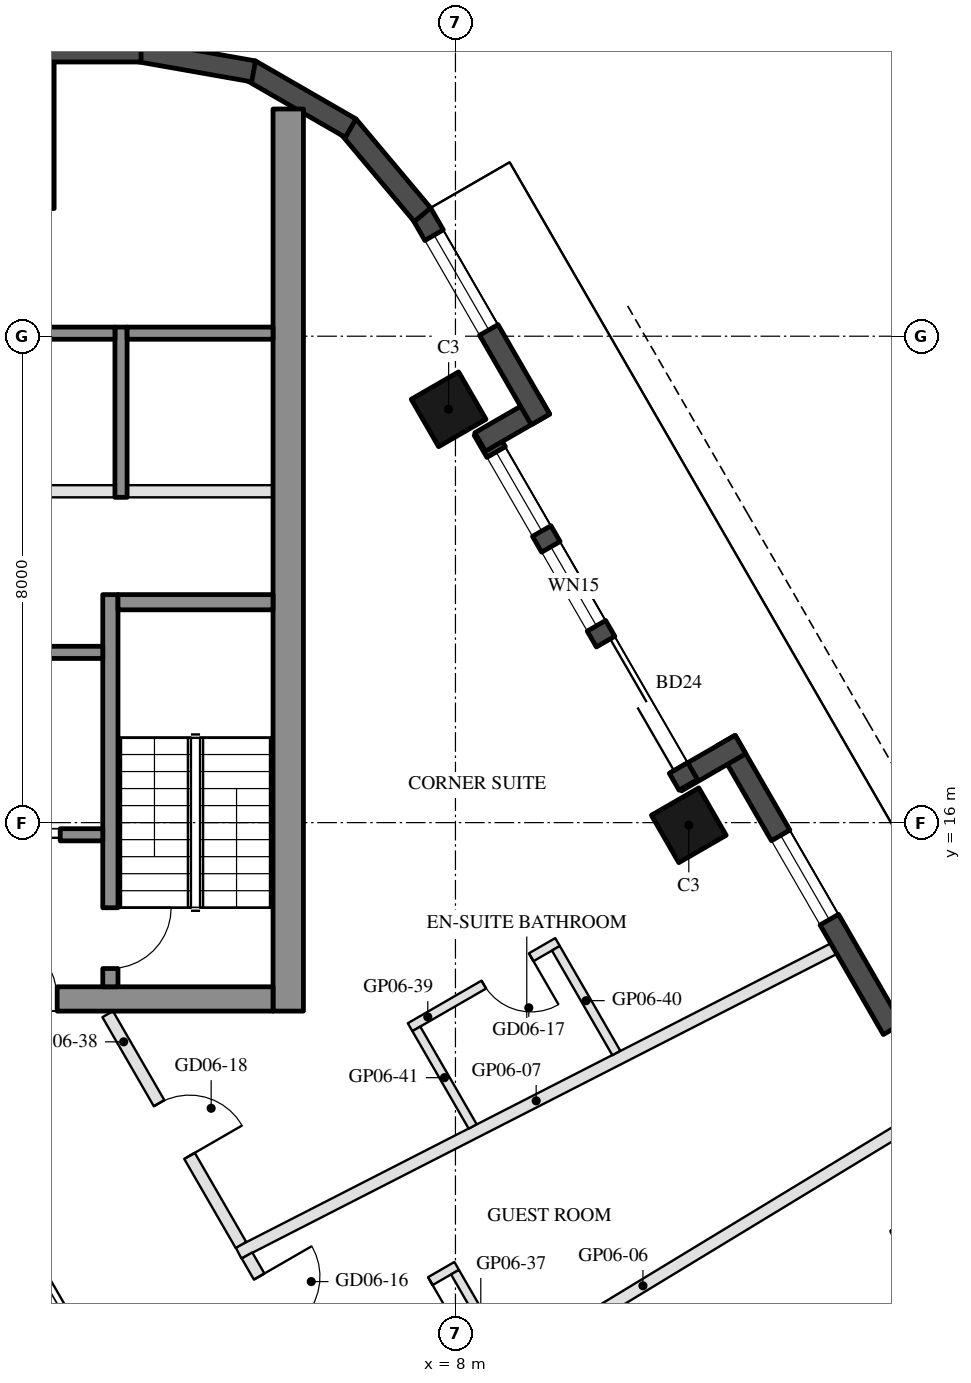
"""IFC4 building model, lengths in metres.
Left out: names, types, materials, properties, quantities, classifications, styles, units other than length and angle.
Written with IfcOpenShell. Run it as: python <this file> out.ifc"""

import sys

from ifc_helpers import new_model, si_unit, direction, frame, frame_2d, origin, origin_2d, place, context, subcontext, project, spatial, rectangle, hollow_rectangle, extrude, element, fill, save


model = new_model("IFC4")
c1 = context("Model", 3, precision=1e-05, world=origin(), true_north=direction((0.0, 1.0)))
c2 = subcontext(c1, "Body", "Model", "MODEL_VIEW")
j1 = project(units=[si_unit("LENGTHUNIT", "METRE"), si_unit("PLANEANGLEUNIT", "RADIAN")], contexts=[c1])
p1 = place(None, origin())
s1 = spatial("IfcSite", under=j1, at=p1, CompositionType="ELEMENT")
p2 = place(p1, origin())
s2 = spatial("IfcBuilding", under=s1, at=p2, CompositionType="ELEMENT")
p3 = place(p2, frame((0.0, 0.0, 90.9)))
s3 = spatial("IfcBuildingStorey", under=s2, at=p3, CompositionType="ELEMENT", Elevation=90.9)
for number, where, z_axis, x_axis in (
    (1, (11.838, 15.957, 0.0), (0.0, 0.0, 1.0), (-0.5, 0.866, 0.0)),
    (2, (7.888, 22.798, 0.0), (0.0, 0.0, 1.0), (-0.5, 0.866, 0.0)),
):
    element("IfcColumn", number, at=place(p3, frame(where, z_axis=z_axis, x_axis=x_axis)), inside=s3, PredefinedType="COLUMN", context=c2, shape_type="SweptSolid", body=[
        extrude(hollow_rectangle(XDim=0.9, YDim=0.9, WallThickness=0.04, at=origin_2d()), origin(), (0.0, 0.0, 1.0), 3.7),
    ])
p4 = place(p3, frame((0.0, 27.3, 0.0), z_axis=(0.0, 0.0, 1.0), x_axis=(1.0, 0.0, 0.0)))
e3 = element("IfcColumn", 3, at=p4, inside=s3, PredefinedType="COLUMN", context=c2, shape_type="SweptSolid", body=[
    extrude(hollow_rectangle(XDim=2.8, YDim=2.4, WallThickness=0.07, at=origin_2d()), origin(), (0.0, 0.0, 1.0), 3.7),
])
p5 = place(p3, frame((17.299, 8.948, 0.0), z_axis=(0.0, 0.0, 1.0), x_axis=(-0.500010041276, 0.866019606374, 0.0)))
e4 = element("IfcWall", 4, at=p5, inside=s3, PredefinedType="SOLIDWALL", context=c2, shape_type="SweptSolid", body=[
    extrude(rectangle(XDim=9.7, YDim=0.35, at=frame_2d((4.85, 0.0))), origin(), (0.0, 0.0, 1.0), 3.55),
])
p6 = place(p5, frame((3.22, 0.0, 0.0)))
e5 = element("IfcOpeningElement", 5, at=p6, cuts=e4, PredefinedType="OPENING", context=c2, shape_type="SweptSolid", body=[
    extrude(rectangle(XDim=1.0, YDim=2.4, at=frame_2d((0.5, 1.2))), frame((0.0, 0.185, 0.0), z_axis=(0.0, -1.0, 0.0), x_axis=(1.0, 0.0, 0.0)), (0.0, 0.0, 1.0), 0.37),
])
p7 = place(p5, frame((6.3, 0.0, 0.3)))
e6 = element("IfcOpeningElement", 6, at=p7, cuts=e4, PredefinedType="OPENING", context=c2, shape_type="SweptSolid", body=[
    extrude(rectangle(XDim=1.6, YDim=2.65, at=frame_2d((0.8, 1.325))), frame((0.0, 0.185, 0.0), z_axis=(0.0, -1.0, 0.0), x_axis=(1.0, 0.0, 0.0)), (0.0, 0.0, 1.0), 0.37),
])
p8 = place(p3, frame((12.688, 17.284, 0.0), z_axis=(0.0, 0.0, 1.0), x_axis=(-0.865955602162, -0.500120880472, 0.0)))
e7 = element("IfcWall", 7, at=p8, inside=s3, PredefinedType="SOLIDWALL", context=c2, shape_type="SweptSolid", body=[
    extrude(rectangle(XDim=1.22, YDim=0.35, at=frame_2d((0.61, 0.0))), origin(), (0.0, 0.0, 1.0), 3.55),
])
p9 = place(p3, frame((11.829, 16.621, 0.0), z_axis=(0.0, 0.0, 1.0), x_axis=(-0.500003597184, 0.866023326939, 0.0)))
e8 = element("IfcWall", 8, at=p9, inside=s3, PredefinedType="SOLIDWALL", context=c2, shape_type="SweptSolid", body=[
    extrude(rectangle(XDim=6.74, YDim=0.35, at=frame_2d((3.37, 0.0))), origin(), (0.0, 0.0, 1.0), 3.55),
])
p10 = place(p9, frame((0.32, 0.0, 0.0)))
e9 = element("IfcOpeningElement", 9, at=p10, cuts=e8, PredefinedType="OPENING", context=c2, shape_type="SweptSolid", body=[
    extrude(rectangle(XDim=2.4, YDim=2.4, at=frame_2d((1.2, 1.2))), frame((0.0, 0.185, 0.0), z_axis=(0.0, -1.0, 0.0), x_axis=(1.0, 0.0, 0.0)), (0.0, 0.0, 1.0), 0.37),
])
p11 = place(p9, frame((3.02, 0.0, 0.3)))
e10 = element("IfcOpeningElement", 10, at=p11, cuts=e8, PredefinedType="OPENING", context=c2, shape_type="SweptSolid", body=[
    extrude(rectangle(XDim=1.5, YDim=2.65, at=frame_2d((0.75, 1.325))), frame((0.0, 0.185, 0.0), z_axis=(0.0, -1.0, 0.0), x_axis=(1.0, 0.0, 0.0)), (0.0, 0.0, 1.0), 0.37),
])
p12 = place(p9, frame((4.82, 0.0, 0.3)))
e11 = element("IfcOpeningElement", 11, at=p12, cuts=e8, PredefinedType="OPENING", context=c2, shape_type="SweptSolid", body=[
    extrude(rectangle(XDim=1.5, YDim=2.65, at=frame_2d((0.75, 1.325))), frame((0.0, 0.185, 0.0), z_axis=(0.0, -1.0, 0.0), x_axis=(1.0, 0.0, 0.0)), (0.0, 0.0, 1.0), 0.37),
])
p13 = place(p3, frame((8.406, 22.26, 0.0), z_axis=(0.0, 0.0, 1.0), x_axis=(0.865955602162, 0.500120880472, 0.0)))
e12 = element("IfcWall", 12, at=p13, inside=s3, PredefinedType="SOLIDWALL", context=c2, shape_type="SweptSolid", body=[
    extrude(rectangle(XDim=1.22, YDim=0.35, at=frame_2d((0.61, 0.0))), origin(), (0.0, 0.0, 1.0), 3.55),
])
p14 = place(p3, frame((9.398, 22.631, 0.0), z_axis=(0.0, 0.0, 1.0), x_axis=(-0.499954521343, 0.866051659307, 0.0)))
e13 = element("IfcWall", 13, at=p14, inside=s3, PredefinedType="SOLIDWALL", context=c2, shape_type="SweptSolid", body=[
    extrude(rectangle(XDim=3.916, YDim=0.35, at=frame_2d((1.958, 0.0))), origin(), (0.0, 0.0, 1.0), 3.55),
])
p15 = place(p14, frame((1.7, 0.0, 0.3)))
e14 = element("IfcOpeningElement", 14, at=p15, cuts=e13, PredefinedType="OPENING", context=c2, shape_type="SweptSolid", body=[
    extrude(rectangle(XDim=1.8, YDim=2.65, at=frame_2d((0.9, 1.325))), frame((0.0, 0.185, 0.0), z_axis=(0.0, -1.0, 0.0), x_axis=(1.0, 0.0, 0.0)), (0.0, 0.0, 1.0), 0.37),
])
p16 = place(p3, frame((7.458, 25.998, 0.0), z_axis=(0.0, 0.0, 1.0), x_axis=(-0.642808304945, 0.766027077259, 0.0)))
e15 = element("IfcWall", 15, at=p16, inside=s3, PredefinedType="SOLIDWALL", context=c2, shape_type="SweptSolid", body=[
    extrude(rectangle(XDim=1.91, YDim=0.35, at=frame_2d((0.955, 0.0))), origin(), (0.0, 0.0, 1.0), 3.55),
])
for number, where, z_axis, x_axis in (
    (16, (6.277, 27.422, 0.0), (0.0, 0.0, 1.0), (-0.866, 0.5, 0.0)),
    (17, (4.68, 28.356, 0.0), (0.0, 0.0, 1.0), (-0.985, 0.174, 0.0)),
):
    element("IfcWall", number, at=place(p3, frame(where, z_axis=z_axis, x_axis=x_axis)), inside=s3, PredefinedType="SOLIDWALL", context=c2, shape_type="SweptSolid", body=[
        extrude(rectangle(XDim=1.91, YDim=0.35, at=frame_2d((0.955, 0.0))), origin(), (0.0, 0.0, 1.0), 3.55),
    ])
p17 = place(p3, frame((2.829, 28.685, 0.0), z_axis=(0.0, 0.0, 1.0), x_axis=(-1.0, 0.0, 0.0)))
e18 = element("IfcWall", 18, at=p17, inside=s3, PredefinedType="SOLIDWALL", context=c2, shape_type="SweptSolid", body=[
    extrude(rectangle(XDim=5.658, YDim=0.35, at=frame_2d((2.829, 0.0))), origin(), (0.0, 0.0, 1.0), 3.55),
])
p18 = place(p3, frame((5.25, 12.9, 0.0), z_axis=(0.0, 0.0, 1.0), x_axis=(0.0, 1.0, 0.0)))
e19 = element("IfcWall", 19, at=p18, inside=s3, PredefinedType="SHEAR", context=c2, shape_type="SweptSolid", body=[
    extrude(rectangle(XDim=14.837, YDim=0.5, at=frame_2d((7.418, 0.0))), origin(), (0.0, 0.0, 1.0), 3.5),
])
p19 = place(p3, frame((5.0, 13.1, 0.0), z_axis=(0.0, 0.0, 1.0), x_axis=(-1.0, 0.0, 0.0)))
e20 = element("IfcWall", 20, at=p19, inside=s3, PredefinedType="SHEAR", context=c2, shape_type="SweptSolid", body=[
    extrude(rectangle(XDim=10.0, YDim=0.4, at=frame_2d((5.0, 0.0))), origin(), (0.0, 0.0, 1.0), 3.5),
])
p20 = place(p19, frame((3.55, 0.0, 0.0)))
e21 = element("IfcOpeningElement", 21, at=p20, cuts=e20, PredefinedType="OPENING", context=c2, shape_type="SweptSolid", body=[
    extrude(rectangle(XDim=1.1, YDim=2.1, at=frame_2d((0.55, 1.05))), frame((0.0, 0.21, 0.0), z_axis=(0.0, -1.0, 0.0), x_axis=(1.0, 0.0, 0.0)), (0.0, 0.0, 1.0), 0.42),
])
p21 = place(p19, frame((5.85, 0.0, 0.0)))
e22 = element("IfcOpeningElement", 22, at=p21, cuts=e20, PredefinedType="OPENING", context=c2, shape_type="SweptSolid", body=[
    extrude(rectangle(XDim=1.4, YDim=2.1, at=frame_2d((0.7, 1.05))), frame((0.0, 0.21, 0.0), z_axis=(0.0, -1.0, 0.0), x_axis=(1.0, 0.0, 0.0)), (0.0, 0.0, 1.0), 0.42),
])
p22 = place(p3, frame((2.325, 13.3, 0.0), z_axis=(0.0, 0.0, 1.0), x_axis=(0.0, 1.0, 0.0)))
e23 = element("IfcWall", 23, at=p22, inside=s3, PredefinedType="SHEAR", context=c2, shape_type="SweptSolid", body=[
    extrude(rectangle(XDim=6.45, YDim=0.25, at=frame_2d((3.225, 0.0))), origin(), (0.0, 0.0, 1.0), 3.5),
])
p23 = place(p22, frame((0.3, 0.0, 0.0)))
e24 = element("IfcOpeningElement", 24, at=p23, cuts=e23, PredefinedType="OPENING", context=c2, shape_type="SweptSolid", body=[
    extrude(rectangle(XDim=1.0, YDim=2.1, at=frame_2d((0.5, 1.05))), frame((0.0, 0.135, 0.0), z_axis=(0.0, -1.0, 0.0), x_axis=(1.0, 0.0, 0.0)), (0.0, 0.0, 1.0), 0.27),
])
p24 = place(p3, frame((5.0, 19.625, 0.0), z_axis=(0.0, 0.0, 1.0), x_axis=(-1.0, 0.0, 0.0)))
e25 = element("IfcWall", 25, at=p24, inside=s3, PredefinedType="SHEAR", context=c2, shape_type="SweptSolid", body=[
    extrude(rectangle(XDim=2.55, YDim=0.25, at=frame_2d((1.275, 0.0))), origin(), (0.0, 0.0, 1.0), 3.5),
])
p25 = place(p3, frame((2.2, 18.8, 0.0), z_axis=(0.0, 0.0, 1.0), x_axis=(-1.0, 0.0, 0.0)))
e26 = element("IfcWall", 26, at=p25, inside=s3, PredefinedType="SHEAR", context=c2, shape_type="SweptSolid", body=[
    extrude(rectangle(XDim=2.8, YDim=0.2, at=frame_2d((1.4, 0.0))), origin(), (0.0, 0.0, 1.0), 3.5),
])
p26 = place(p3, frame((2.2, 15.8, 0.0), z_axis=(0.0, 0.0, 1.0), x_axis=(-1.0, 0.0, 0.0)))
e27 = element("IfcWall", 27, at=p26, inside=s3, PredefinedType="SHEAR", context=c2, shape_type="SweptSolid", body=[
    extrude(rectangle(XDim=2.8, YDim=0.2, at=frame_2d((1.4, 0.0))), origin(), (0.0, 0.0, 1.0), 3.5),
])
p27 = place(p26, frame((0.7, 0.0, 0.0)))
e28 = element("IfcOpeningElement", 28, at=p27, cuts=e27, PredefinedType="OPENING", context=c2, shape_type="SweptSolid", body=[
    extrude(rectangle(XDim=1.2, YDim=2.1, at=frame_2d((0.6, 1.05))), frame((0.0, 0.11, 0.0), z_axis=(0.0, -1.0, 0.0), x_axis=(1.0, 0.0, 0.0)), (0.0, 0.0, 1.0), 0.22),
])
p28 = place(p3, frame((2.5, 21.35, 0.0), z_axis=(0.0, 0.0, 1.0), x_axis=(0.0, 1.0, 0.0)))
e29 = element("IfcWall", 29, at=p28, inside=s3, PredefinedType="SHEAR", context=c2, shape_type="SweptSolid", body=[
    extrude(rectangle(XDim=2.8, YDim=0.2, at=frame_2d((1.4, 0.0))), origin(), (0.0, 0.0, 1.0), 3.5),
])
p29 = place(p3, frame((5.0, 24.05, 0.0), z_axis=(0.0, 0.0, 1.0), x_axis=(-1.0, 0.0, 0.0)))
e30 = element("IfcWall", 30, at=p29, inside=s3, PredefinedType="SHEAR", context=c2, shape_type="SweptSolid", body=[
    extrude(rectangle(XDim=2.4, YDim=0.2, at=frame_2d((1.2, 0.0))), origin(), (0.0, 0.0, 1.0), 3.5),
])
p30 = place(p3, frame((2.4, 24.05, 0.0), z_axis=(0.0, 0.0, 1.0), x_axis=(-1.0, 0.0, 0.0)))
e31 = element("IfcWall", 31, at=p30, inside=s3, PredefinedType="SHEAR", context=c2, shape_type="SweptSolid", body=[
    extrude(rectangle(XDim=2.8, YDim=0.2, at=frame_2d((1.4, 0.0))), origin(), (0.0, 0.0, 1.0), 3.5),
])
p31 = place(p3, frame((5.0, 21.45, 0.0), z_axis=(0.0, 0.0, 1.0), x_axis=(-1.0, 0.0, 0.0)))
e32 = element("IfcWall", 32, at=p31, inside=s3, PredefinedType="PARTITIONING", context=c2, shape_type="SweptSolid", body=[
    extrude(rectangle(XDim=2.4, YDim=0.2, at=frame_2d((1.2, 0.0))), origin(), (0.0, 0.0, 1.0), 3.5),
])
p32 = place(p3, frame((2.4, 21.45, 0.0), z_axis=(0.0, 0.0, 1.0), x_axis=(-1.0, 0.0, 0.0)))
e33 = element("IfcWall", 33, at=p32, inside=s3, PredefinedType="PARTITIONING", context=c2, shape_type="SweptSolid", body=[
    extrude(rectangle(XDim=2.8, YDim=0.2, at=frame_2d((1.4, 0.0))), origin(), (0.0, 0.0, 1.0), 3.5),
])
p33 = place(p3, frame((15.777, 11.233, 0.0), z_axis=(0.0, 0.0, 1.0), x_axis=(-0.854689239939, -0.519139964877, 0.0)))
e34 = element("IfcWall", 34, at=p33, inside=s3, PredefinedType="PARTITIONING", context=c2, shape_type="SweptSolid", body=[
    extrude(rectangle(XDim=10.983, YDim=0.2, at=frame_2d((5.491, 0.0))), origin(), (0.0, 0.0, 1.0), 2.96),
])
p34 = place(p3, frame((14.222, 13.927, 0.0), z_axis=(0.0, 0.0, 1.0), x_axis=(-0.890385282198, -0.455207699017, 0.0)))
e35 = element("IfcWall", 35, at=p34, inside=s3, PredefinedType="PARTITIONING", context=c2, shape_type="SweptSolid", body=[
    extrude(rectangle(XDim=10.994, YDim=0.2, at=frame_2d((5.497, 0.0))), origin(), (0.0, 0.0, 1.0), 2.96),
])
p35 = place(p3, frame((4.572, 8.881, 0.0), z_axis=(0.0, 0.0, 1.0), x_axis=(0.500041684057, -0.866001336145, 0.0)))
e36 = element("IfcWall", 36, at=p35, inside=s3, PredefinedType="PARTITIONING", context=c2, shape_type="SweptSolid", body=[
    extrude(rectangle(XDim=3.707, YDim=0.2, at=frame_2d((1.854, 0.0))), origin(), (0.0, 0.0, 1.0), 2.95),
])
p36 = place(p35, frame((0.4, 0.0, 0.0)))
e37 = element("IfcOpeningElement", 37, at=p36, cuts=e36, PredefinedType="OPENING", context=c2, shape_type="SweptSolid", body=[
    extrude(rectangle(XDim=1.0, YDim=2.1, at=frame_2d((0.5, 1.05))), frame((0.0, 0.11, 0.0), z_axis=(0.0, -1.0, 0.0), x_axis=(1.0, 0.0, 0.0)), (0.0, 0.0, 1.0), 0.22),
])
p37 = place(p3, frame((8.02, 8.709, 0.0), z_axis=(0.0, 0.0, 1.0), x_axis=(-0.866034573852, -0.49998411664, 0.0)))
e38 = element("IfcWall", 38, at=p37, inside=s3, PredefinedType="PARTITIONING", context=c2, shape_type="SweptSolid", body=[
    extrude(rectangle(XDim=2.8, YDim=0.15, at=frame_2d((1.4, 0.0))), origin(), (0.0, 0.0, 1.0), 3.55),
])
p38 = place(p37, frame((0.5, 0.0, 0.0)))
e39 = element("IfcOpeningElement", 39, at=p38, cuts=e38, PredefinedType="OPENING", context=c2, shape_type="SweptSolid", body=[
    extrude(rectangle(XDim=0.9, YDim=2.1, at=frame_2d((0.45, 1.05))), frame((0.0, 0.085, 0.0), z_axis=(0.0, -1.0, 0.0), x_axis=(1.0, 0.0, 0.0)), (0.0, 0.0, 1.0), 0.17),
])
p39 = place(p3, frame((8.841, 7.137, 0.0), z_axis=(0.0, 0.0, 1.0), x_axis=(-0.500054617923, 0.865993867816, 0.0)))
e40 = element("IfcWall", 40, at=p39, inside=s3, PredefinedType="PARTITIONING", context=c2, shape_type="SweptSolid", body=[
    extrude(rectangle(XDim=1.697, YDim=0.15, at=frame_2d((0.848, 0.0))), origin(), (0.0, 0.0, 1.0), 3.55),
])
p40 = place(p3, frame((2.281, 12.85, 0.0), z_axis=(0.0, 0.0, 1.0), x_axis=(0.499973180286, -0.8660408876, 0.0)))
e41 = element("IfcWall", 41, at=p40, inside=s3, PredefinedType="PARTITIONING", context=c2, shape_type="SweptSolid", body=[
    extrude(rectangle(XDim=4.383, YDim=0.2, at=frame_2d((2.191, 0.0))), origin(), (0.0, 0.0, 1.0), 2.95),
])
p41 = place(p40, frame((1.691, 0.0, 0.0)))
e42 = element("IfcOpeningElement", 42, at=p41, cuts=e41, PredefinedType="OPENING", context=c2, shape_type="SweptSolid", body=[
    extrude(rectangle(XDim=1.0, YDim=2.1, at=frame_2d((0.5, 1.05))), frame((0.0, 0.11, 0.0), z_axis=(0.0, -1.0, 0.0), x_axis=(1.0, 0.0, 0.0)), (0.0, 0.0, 1.0), 0.22),
])
p42 = place(p3, frame((9.679, 14.036, 0.0), z_axis=(0.0, 0.0, 1.0), x_axis=(-0.865996816683, -0.500049511043, 0.0)))
e43 = element("IfcWall", 43, at=p42, inside=s3, PredefinedType="PARTITIONING", context=c2, shape_type="SweptSolid", body=[
    extrude(rectangle(XDim=2.8, YDim=0.15, at=frame_2d((1.4, 0.0))), origin(), (0.0, 0.0, 1.0), 3.55),
])
p43 = place(p42, frame((0.5, 0.0, 0.0)))
e44 = element("IfcOpeningElement", 44, at=p43, cuts=e43, PredefinedType="OPENING", context=c2, shape_type="SweptSolid", body=[
    extrude(rectangle(XDim=0.9, YDim=2.1, at=frame_2d((0.45, 1.05))), frame((0.0, 0.085, 0.0), z_axis=(0.0, -1.0, 0.0), x_axis=(1.0, 0.0, 0.0)), (0.0, 0.0, 1.0), 0.17),
])
p44 = place(p3, frame((10.646, 12.211, 0.0), z_axis=(0.0, 0.0, 1.0), x_axis=(-0.50001992892, 0.866013897511, 0.0)))
e45 = element("IfcWall", 45, at=p44, inside=s3, PredefinedType="PARTITIONING", context=c2, shape_type="SweptSolid", body=[
    extrude(rectangle(XDim=1.989, YDim=0.15, at=frame_2d((0.995, 0.0))), origin(), (0.0, 0.0, 1.0), 3.55),
])
p45 = place(p3, frame((8.283, 11.003, 0.0), z_axis=(0.0, 0.0, 1.0), x_axis=(-0.499935264145, 0.866062775822, 0.0)))
e46 = element("IfcWall", 46, at=p45, inside=s3, PredefinedType="PARTITIONING", context=c2, shape_type="SweptSolid", body=[
    extrude(rectangle(XDim=1.854, YDim=0.15, at=frame_2d((0.927, 0.0))), origin(), (0.0, 0.0, 1.0), 3.55),
])
p46 = place(p6, frame((1.0, 0.0, 0.0), z_axis=(0.0, 0.0, 1.0), x_axis=(-1.0, 0.0, 0.0)))
e47 = element("IfcDoor", 47, at=p46, inside=s3, OperationType="SLIDING_TO_LEFT", PredefinedType="DOOR", context=c2, shape_type="SweptSolid", body=[
    extrude(rectangle(XDim=1.0, YDim=2.4, at=frame_2d((0.5, 1.2))), frame((0.0, 0.025, 0.0), z_axis=(0.0, -1.0, 0.0), x_axis=(1.0, 0.0, 0.0)), (0.0, 0.0, 1.0), 0.05),
])
fill(e5, e47)
p47 = place(p7, origin())
e48 = element("IfcWindow", 48, at=p47, inside=s3, PartitioningType="SINGLE_PANEL", PredefinedType="WINDOW", context=c2, shape_type="SweptSolid", body=[
    extrude(rectangle(XDim=1.6, YDim=2.65, at=frame_2d((0.8, 1.325))), frame((0.0, 0.03, 0.0), z_axis=(0.0, -1.0, 0.0), x_axis=(1.0, 0.0, 0.0)), (0.0, 0.0, 1.0), 0.06),
])
fill(e6, e48)
p48 = place(p10, frame((2.4, 0.0, 0.0), z_axis=(0.0, 0.0, 1.0), x_axis=(-1.0, 0.0, 0.0)))
e49 = element("IfcDoor", 49, at=p48, inside=s3, OperationType="SLIDING_TO_LEFT", PredefinedType="DOOR", context=c2, shape_type="SweptSolid", body=[
    extrude(rectangle(XDim=2.4, YDim=2.4, at=frame_2d((1.2, 1.2))), frame((0.0, 0.025, 0.0), z_axis=(0.0, -1.0, 0.0), x_axis=(1.0, 0.0, 0.0)), (0.0, 0.0, 1.0), 0.05),
])
fill(e9, e49)
p49 = place(p11, origin())
e50 = element("IfcWindow", 50, at=p49, inside=s3, PartitioningType="SINGLE_PANEL", PredefinedType="WINDOW", context=c2, shape_type="SweptSolid", body=[
    extrude(rectangle(XDim=1.5, YDim=2.65, at=frame_2d((0.75, 1.325))), frame((0.0, 0.03, 0.0), z_axis=(0.0, -1.0, 0.0), x_axis=(1.0, 0.0, 0.0)), (0.0, 0.0, 1.0), 0.06),
])
fill(e10, e50)
p50 = place(p12, origin())
e51 = element("IfcWindow", 51, at=p50, inside=s3, PartitioningType="SINGLE_PANEL", PredefinedType="WINDOW", context=c2, shape_type="SweptSolid", body=[
    extrude(rectangle(XDim=1.5, YDim=2.65, at=frame_2d((0.75, 1.325))), frame((0.0, 0.03, 0.0), z_axis=(0.0, -1.0, 0.0), x_axis=(1.0, 0.0, 0.0)), (0.0, 0.0, 1.0), 0.06),
])
fill(e11, e51)
p51 = place(p15, origin())
e52 = element("IfcWindow", 52, at=p51, inside=s3, PartitioningType="SINGLE_PANEL", PredefinedType="WINDOW", context=c2, shape_type="SweptSolid", body=[
    extrude(rectangle(XDim=1.8, YDim=2.65, at=frame_2d((0.9, 1.325))), frame((0.0, 0.03, 0.0), z_axis=(0.0, -1.0, 0.0), x_axis=(1.0, 0.0, 0.0)), (0.0, 0.0, 1.0), 0.06),
])
fill(e14, e52)
p52 = place(p27, origin())
e53 = element("IfcDoor", 53, at=p52, inside=s3, OperationType="DOUBLE_DOOR_SLIDING", PredefinedType="DOOR", context=c2, shape_type="SweptSolid", body=[
    extrude(rectangle(XDim=1.2, YDim=2.1, at=frame_2d((0.6, 1.05))), frame((0.0, 0.025, 0.0), z_axis=(0.0, -1.0, 0.0), x_axis=(1.0, 0.0, 0.0)), (0.0, 0.0, 1.0), 0.05),
])
fill(e28, e53)
p53 = place(p20, frame((1.1, 0.0, 0.0), z_axis=(0.0, 0.0, 1.0), x_axis=(-1.0, 0.0, 0.0)))
e54 = element("IfcDoor", 54, at=p53, inside=s3, OperationType="SINGLE_SWING_LEFT", PredefinedType="DOOR", context=c2, shape_type="SweptSolid", body=[
    extrude(rectangle(XDim=1.1, YDim=2.1, at=frame_2d((0.55, 1.05))), frame((0.0, 0.025, 0.0), z_axis=(0.0, -1.0, 0.0), x_axis=(1.0, 0.0, 0.0)), (0.0, 0.0, 1.0), 0.05),
])
fill(e21, e54)
p54 = place(p23, frame((1.0, 0.0, 0.0), z_axis=(0.0, 0.0, 1.0), x_axis=(-1.0, 0.0, 0.0)))
e55 = element("IfcDoor", 55, at=p54, inside=s3, OperationType="SINGLE_SWING_LEFT", PredefinedType="DOOR", context=c2, shape_type="SweptSolid", body=[
    extrude(rectangle(XDim=1.0, YDim=2.1, at=frame_2d((0.5, 1.05))), frame((0.0, 0.025, 0.0), z_axis=(0.0, -1.0, 0.0), x_axis=(1.0, 0.0, 0.0)), (0.0, 0.0, 1.0), 0.05),
])
fill(e24, e55)
p55 = place(p38, origin())
e56 = element("IfcDoor", 56, at=p55, inside=s3, OperationType="SINGLE_SWING_LEFT", PredefinedType="DOOR", context=c2, shape_type="SweptSolid", body=[
    extrude(rectangle(XDim=0.9, YDim=2.1, at=frame_2d((0.45, 1.05))), frame((0.0, 0.025, 0.0), z_axis=(0.0, -1.0, 0.0), x_axis=(1.0, 0.0, 0.0)), (0.0, 0.0, 1.0), 0.05),
])
fill(e39, e56)
p56 = place(p36, origin())
e57 = element("IfcDoor", 57, at=p56, inside=s3, OperationType="SINGLE_SWING_LEFT", PredefinedType="DOOR", context=c2, shape_type="SweptSolid", body=[
    extrude(rectangle(XDim=1.0, YDim=2.1, at=frame_2d((0.5, 1.05))), frame((0.0, 0.025, 0.0), z_axis=(0.0, -1.0, 0.0), x_axis=(1.0, 0.0, 0.0)), (0.0, 0.0, 1.0), 0.05),
])
fill(e37, e57)
p57 = place(p43, origin())
e58 = element("IfcDoor", 58, at=p57, inside=s3, OperationType="SINGLE_SWING_LEFT", PredefinedType="DOOR", context=c2, shape_type="SweptSolid", body=[
    extrude(rectangle(XDim=0.9, YDim=2.1, at=frame_2d((0.45, 1.05))), frame((0.0, 0.025, 0.0), z_axis=(0.0, -1.0, 0.0), x_axis=(1.0, 0.0, 0.0)), (0.0, 0.0, 1.0), 0.05),
])
fill(e44, e58)
p58 = place(p41, origin())
e59 = element("IfcDoor", 59, at=p58, inside=s3, OperationType="SINGLE_SWING_RIGHT", PredefinedType="DOOR", context=c2, shape_type="SweptSolid", body=[
    extrude(rectangle(XDim=1.0, YDim=2.1, at=frame_2d((0.5, 1.05))), frame((0.0, 0.025, 0.0), z_axis=(0.0, -1.0, 0.0), x_axis=(1.0, 0.0, 0.0)), (0.0, 0.0, 1.0), 0.05),
])
fill(e42, e59)
save(model, sys.argv[1])
